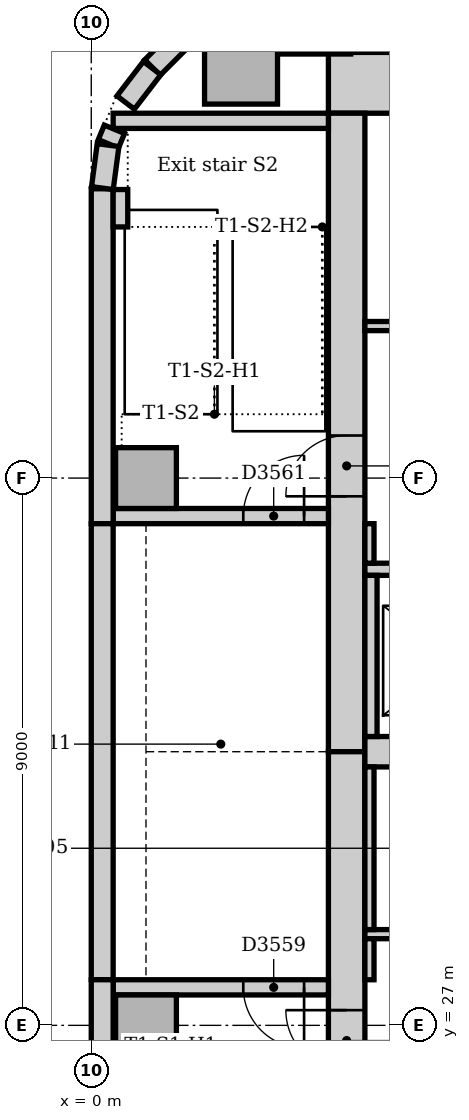
"""IFC4 building model, lengths in metres.
Left out: names, types, materials, properties, quantities, classifications, styles, units other than length and angle.
Written with IfcOpenShell. Run it as: python <this file> out.ifc"""

import sys

from ifc_helpers import new_model, si_unit, direction, frame, frame_2d, origin, origin_2d, place, context, subcontext, project, spatial, rectangle, extrude, element, fill, save


model = new_model("IFC4")
c1 = context("Model", 3, precision=1e-05, world=origin(), true_north=direction((0.0, 1.0)))
c2 = subcontext(c1, "Body", "Model", "MODEL_VIEW")
j1 = project(units=[si_unit("LENGTHUNIT", "METRE"), si_unit("PLANEANGLEUNIT", "RADIAN")], contexts=[c1])
p1 = place(None, origin())
s1 = spatial("IfcSite", under=j1, at=p1, CompositionType="ELEMENT")
p2 = place(p1, origin())
s2 = spatial("IfcBuilding", under=s1, at=p2, CompositionType="ELEMENT")
p3 = place(p2, frame((0.0, 0.0, 63.0)))
s3 = spatial("IfcBuildingStorey", under=s2, at=p3, CompositionType="ELEMENT", Elevation=63.0)
p4 = place(p3, frame((23.5, 42.5, 0.0), z_axis=(0.0, 0.0, 1.0), x_axis=(-1.0, 0.0, 0.0)))
e1 = element("IfcWall", 1, at=p4, inside=s3, PredefinedType="SOLIDWALL", context=c2, shape_type="SweptSolid", body=[
    extrude(rectangle(XDim=19.6, YDim=1.0, at=frame_2d((9.8, 0.0))), origin(), (0.0, 0.0, 1.0), 4.0),
])
p5 = place(p3, frame((4.2, 42.0, 0.0), z_axis=(0.0, 0.0, 1.0), x_axis=(0.0, -1.0, 0.0)))
e2 = element("IfcWall", 2, at=p5, inside=s3, PredefinedType="SOLIDWALL", context=c2, shape_type="SweptSolid", body=[
    extrude(rectangle(XDim=10.5, YDim=0.6, at=frame_2d((5.25, 0.0))), origin(), (0.0, 0.0, 1.0), 4.0),
])
p6 = place(p5, frame((5.3, 0.0, 0.0)))
e3 = element("IfcOpeningElement", 3, at=p6, cuts=e2, PredefinedType="OPENING", context=c2, shape_type="SweptSolid", body=[
    extrude(rectangle(XDim=1.0, YDim=2.1, at=frame_2d((0.5, 1.05))), frame((0.0, 0.31, 0.0), z_axis=(0.0, -1.0, 0.0), x_axis=(1.0, 0.0, 0.0)), (0.0, 0.0, 1.0), 0.62),
])
p7 = place(p3, frame((4.2, 31.5, 0.0), z_axis=(0.0, 0.0, 1.0), x_axis=(0.0, -1.0, 0.0)))
e4 = element("IfcWall", 4, at=p7, inside=s3, PredefinedType="SOLIDWALL", context=c2, shape_type="SweptSolid", body=[
    extrude(rectangle(XDim=10.5, YDim=0.6, at=frame_2d((5.25, 0.0))), origin(), (0.0, 0.0, 1.0), 4.0),
])
p8 = place(p7, frame((4.25, 0.0, 0.0)))
e5 = element("IfcOpeningElement", 5, at=p8, cuts=e4, PredefinedType="OPENING", context=c2, shape_type="SweptSolid", body=[
    extrude(rectangle(XDim=1.0, YDim=2.1, at=frame_2d((0.5, 1.05))), frame((0.0, 0.31, 0.0), z_axis=(0.0, -1.0, 0.0), x_axis=(1.0, 0.0, 0.0)), (0.0, 0.0, 1.0), 0.62),
])
p9 = place(p3, frame((4.5, 31.5, 0.0), z_axis=(0.0, 0.0, 1.0), x_axis=(1.0, 0.0, 0.0)))
e6 = element("IfcWall", 6, at=p9, inside=s3, PredefinedType="SOLIDWALL", context=c2, shape_type="SweptSolid", body=[
    extrude(rectangle(XDim=18.0, YDim=0.5, at=frame_2d((9.0, 0.0))), origin(), (0.0, 0.0, 1.0), 4.0),
])
p10 = place(p3, frame((3.9, 27.625, 0.0), z_axis=(0.0, 0.0, 1.0), x_axis=(-1.0, 0.0, 0.0)))
e7 = element("IfcWall", 7, at=p10, inside=s3, PredefinedType="SOLIDWALL", context=c2, shape_type="SweptSolid", body=[
    extrude(rectangle(XDim=3.54, YDim=0.25, at=frame_2d((1.77, 0.0))), origin(), (0.0, 0.0, 1.0), 4.0),
])
p11 = place(p10, frame((0.4, 0.0, 0.0)))
e8 = element("IfcOpeningElement", 8, at=p11, cuts=e7, PredefinedType="OPENING", context=c2, shape_type="SweptSolid", body=[
    extrude(rectangle(XDim=1.0, YDim=2.1, at=frame_2d((0.5, 1.05))), frame((0.0, 0.135, 0.0), z_axis=(0.0, -1.0, 0.0), x_axis=(1.0, 0.0, 0.0)), (0.0, 0.0, 1.0), 0.27),
])
p12 = place(p3, frame((0.36, 35.375, 0.0), z_axis=(0.0, 0.0, 1.0), x_axis=(1.0, 0.0, 0.0)))
e9 = element("IfcWall", 9, at=p12, inside=s3, PredefinedType="SOLIDWALL", context=c2, shape_type="SweptSolid", body=[
    extrude(rectangle(XDim=3.54, YDim=0.25, at=frame_2d((1.77, 0.0))), origin(), (0.0, 0.0, 1.0), 4.0),
])
p13 = place(p12, frame((2.14, 0.0, 0.0)))
e10 = element("IfcOpeningElement", 10, at=p13, cuts=e9, PredefinedType="OPENING", context=c2, shape_type="SweptSolid", body=[
    extrude(rectangle(XDim=1.0, YDim=2.1, at=frame_2d((0.5, 1.05))), frame((0.0, 0.135, 0.0), z_axis=(0.0, -1.0, 0.0), x_axis=(1.0, 0.0, 0.0)), (0.0, 0.0, 1.0), 0.27),
])
p14 = place(p3, frame((3.9, 41.875, 0.0), z_axis=(0.0, 0.0, 1.0), x_axis=(-1.0, 0.0, 0.0)))
e11 = element("IfcWall", 11, at=p14, inside=s3, PredefinedType="SOLIDWALL", context=c2, shape_type="SweptSolid", body=[
    extrude(rectangle(XDim=3.54, YDim=0.25, at=frame_2d((1.77, 0.0))), origin(), (0.0, 0.0, 1.0), 4.0),
])
for number, where, z_axis, x_axis in (
    (12, (3.667, 43.574, 0.0), (0.0, 0.0, 1.0), (1.0, 0.0, 0.0)),
    (13, (2.463, 42.75, 0.0), (0.0, 0.0, 1.0), (1.0, 0.0, 0.0)),
):
    element("IfcColumn", number, at=place(p3, frame(where, z_axis=z_axis, x_axis=x_axis)), inside=s3, PredefinedType="COLUMN", context=c2, shape_type="SweptSolid", body=[
        extrude(rectangle(XDim=1.2, YDim=1.2, at=origin_2d()), origin(), (0.0, 0.0, 1.0), 3.85),
    ])
for number, where, z_axis, x_axis in (
    (14, (0.9, 27.0, 0.0), (0.0, 0.0, 1.0), (1.0, 0.0, 0.0)),
    (15, (0.9, 36.0, 0.0), (0.0, 0.0, 1.0), (1.0, 0.0, 0.0)),
):
    element("IfcColumn", number, at=place(p3, frame(where, z_axis=z_axis, x_axis=x_axis)), inside=s3, PredefinedType="COLUMN", context=c2, shape_type="SweptSolid", body=[
        extrude(rectangle(XDim=1.0, YDim=1.0, at=origin_2d()), origin(), (0.0, 0.0, 1.0), 4.0),
    ])
p15 = place(p3, frame((2.249, 43.994, 0.0), z_axis=(0.0, 0.0, 1.0), x_axis=(-0.707106781187, -0.707106781187, 0.0)))
e16 = element("IfcWall", 16, at=p15, inside=s3, PredefinedType="STANDARD", context=c2, shape_type="SweptSolid", body=[
    extrude(rectangle(XDim=1.757, YDim=0.36, at=frame_2d((0.879, 0.0))), origin(), (0.0, 0.0, 1.0), 3.85),
])
p16 = place(p3, frame((0.18, 40.757, 0.0), z_axis=(0.0, 0.0, 1.0), x_axis=(0.0, -1.0, 0.0)))
e17 = element("IfcWall", 17, at=p16, inside=s3, PredefinedType="STANDARD", context=c2, shape_type="SweptSolid", body=[
    extrude(rectangle(XDim=5.507, YDim=0.36, at=frame_2d((2.754, 0.0))), origin(), (0.0, 0.0, 1.0), 3.85),
])
p17 = place(p3, frame((0.18, 35.25, 0.0), z_axis=(0.0, 0.0, 1.0), x_axis=(0.0, -1.0, 0.0)))
e18 = element("IfcWall", 18, at=p17, inside=s3, PredefinedType="STANDARD", context=c2, shape_type="SweptSolid", body=[
    extrude(rectangle(XDim=7.5, YDim=0.36, at=frame_2d((3.75, 0.0))), origin(), (0.0, 0.0, 1.0), 3.85),
])
p18 = place(p3, frame((0.18, 27.75, 0.0), z_axis=(0.0, 0.0, 1.0), x_axis=(0.0, -1.0, 0.0)))
e19 = element("IfcWall", 19, at=p18, inside=s3, PredefinedType="STANDARD", context=c2, shape_type="SweptSolid", body=[
    extrude(rectangle(XDim=6.75, YDim=0.36, at=frame_2d((3.375, 0.0))), origin(), (0.0, 0.0, 1.0), 3.85),
])
p19 = place(p3, frame((1.0, 42.741, 0.0), z_axis=(0.0, 0.0, 1.0), x_axis=(-0.608802368033, -0.793321924995, 0.0)))
e20 = element("IfcWall", 20, at=p19, inside=s3, PredefinedType="STANDARD", context=c2, shape_type="SweptSolid", body=[
    extrude(rectangle(XDim=0.713, YDim=0.36, at=frame_2d((0.357, 0.0))), origin(), (0.0, 0.0, 1.0), 3.85),
])
p20 = place(p3, frame((0.381, 41.736, 0.0), z_axis=(0.0, 0.0, 1.0), x_axis=(-0.382773360986, -0.923842277729, 0.0)))
e21 = element("IfcWall", 21, at=p20, inside=s3, PredefinedType="STANDARD", context=c2, shape_type="SweptSolid", body=[
    extrude(rectangle(XDim=0.258, YDim=0.36, at=frame_2d((0.129, 0.0))), origin(), (0.0, 0.0, 1.0), 3.85),
])
p21 = place(p3, frame((0.276, 41.476, 0.0), z_axis=(0.0, 0.0, 1.0), x_axis=(-0.13055608231, -0.99144092581, 0.0)))
e22 = element("IfcWall", 22, at=p21, inside=s3, PredefinedType="STANDARD", context=c2, shape_type="SweptSolid", body=[
    extrude(rectangle(XDim=0.713, YDim=0.36, at=frame_2d((0.356, 0.0))), origin(), (0.0, 0.0, 1.0), 3.85),
])
p22 = place(p3, frame((0.48, 40.13, 0.0), z_axis=(0.0, 0.0, 1.0), x_axis=(0.0, 1.0, 0.0)))
e23 = element("IfcWall", 23, at=p22, inside=s3, PredefinedType="STANDARD", context=c2, shape_type="SweptSolid", body=[
    extrude(rectangle(XDim=0.615, YDim=0.24, at=frame_2d((0.307, 0.0))), origin(), (0.0, 0.0, 1.0), 4.0),
])
p23 = place(p3, frame((4.5, 34.5, 0.0), z_axis=(0.0, 0.0, 1.0), x_axis=(1.0, 0.0, 0.0)))
e24 = element("IfcWall", 24, at=p23, inside=s3, PredefinedType="PARTITIONING", context=c2, shape_type="SweptSolid", body=[
    extrude(rectangle(XDim=18.0, YDim=0.2, at=frame_2d((9.0, 0.0))), origin(), (0.0, 0.0, 1.0), 3.85),
])
p24 = place(p23, frame((0.95, 0.0, 0.0)))
e25 = element("IfcOpeningElement", 25, at=p24, cuts=e24, PredefinedType="OPENING", context=c2, shape_type="SweptSolid", body=[
    extrude(rectangle(XDim=1.1, YDim=2.1, at=frame_2d((0.55, 1.05))), frame((0.0, 0.11, 0.0), z_axis=(0.0, -1.0, 0.0), x_axis=(1.0, 0.0, 0.0)), (0.0, 0.0, 1.0), 0.22),
])
p25 = place(p23, frame((3.95, 0.0, 0.0)))
e26 = element("IfcOpeningElement", 26, at=p25, cuts=e24, PredefinedType="OPENING", context=c2, shape_type="SweptSolid", body=[
    extrude(rectangle(XDim=1.1, YDim=2.1, at=frame_2d((0.55, 1.05))), frame((0.0, 0.11, 0.0), z_axis=(0.0, -1.0, 0.0), x_axis=(1.0, 0.0, 0.0)), (0.0, 0.0, 1.0), 0.22),
])
p26 = place(p23, frame((12.95, 0.0, 0.0)))
e27 = element("IfcOpeningElement", 27, at=p26, cuts=e24, PredefinedType="OPENING", context=c2, shape_type="SweptSolid", body=[
    extrude(rectangle(XDim=1.1, YDim=2.1, at=frame_2d((0.55, 1.05))), frame((0.0, 0.11, 0.0), z_axis=(0.0, -1.0, 0.0), x_axis=(1.0, 0.0, 0.0)), (0.0, 0.0, 1.0), 0.22),
])
p27 = place(p23, frame((15.95, 0.0, 0.0)))
e28 = element("IfcOpeningElement", 28, at=p27, cuts=e24, PredefinedType="OPENING", context=c2, shape_type="SweptSolid", body=[
    extrude(rectangle(XDim=1.1, YDim=2.1, at=frame_2d((0.55, 1.05))), frame((0.0, 0.11, 0.0), z_axis=(0.0, -1.0, 0.0), x_axis=(1.0, 0.0, 0.0)), (0.0, 0.0, 1.0), 0.22),
])
p28 = place(p3, frame((4.6, 31.75, 0.0), z_axis=(0.0, 0.0, 1.0), x_axis=(0.0, 1.0, 0.0)))
e29 = element("IfcWall", 29, at=p28, inside=s3, PredefinedType="PARTITIONING", context=c2, shape_type="SweptSolid", body=[
    extrude(rectangle(XDim=2.65, YDim=0.2, at=frame_2d((1.325, 0.0))), origin(), (0.0, 0.0, 1.0), 3.85),
])
p29 = place(p3, frame((4.5, 28.5, 0.0), z_axis=(0.0, 0.0, 1.0), x_axis=(1.0, 0.0, 0.0)))
e30 = element("IfcWall", 30, at=p29, inside=s3, PredefinedType="PARTITIONING", context=c2, shape_type="SweptSolid", body=[
    extrude(rectangle(XDim=18.0, YDim=0.15, at=frame_2d((9.0, 0.0))), origin(), (0.0, 0.0, 1.0), 3.85),
])
p30 = place(p29, frame((1.1, 0.0, 0.0)))
e31 = element("IfcOpeningElement", 31, at=p30, cuts=e30, PredefinedType="OPENING", context=c2, shape_type="SweptSolid", body=[
    extrude(rectangle(XDim=0.9, YDim=2.1, at=frame_2d((0.45, 1.05))), frame((0.0, 0.085, 0.0), z_axis=(0.0, -1.0, 0.0), x_axis=(1.0, 0.0, 0.0)), (0.0, 0.0, 1.0), 0.17),
])
p31 = place(p29, frame((5.55, 0.0, 0.0)))
e32 = element("IfcOpeningElement", 32, at=p31, cuts=e30, PredefinedType="OPENING", context=c2, shape_type="SweptSolid", body=[
    extrude(rectangle(XDim=0.9, YDim=2.1, at=frame_2d((0.45, 1.05))), frame((0.0, 0.085, 0.0), z_axis=(0.0, -1.0, 0.0), x_axis=(1.0, 0.0, 0.0)), (0.0, 0.0, 1.0), 0.17),
])
p32 = place(p29, frame((12.95, 0.0, 0.0)))
e33 = element("IfcOpeningElement", 33, at=p32, cuts=e30, PredefinedType="OPENING", context=c2, shape_type="SweptSolid", body=[
    extrude(rectangle(XDim=0.9, YDim=2.1, at=frame_2d((0.45, 1.05))), frame((0.0, 0.085, 0.0), z_axis=(0.0, -1.0, 0.0), x_axis=(1.0, 0.0, 0.0)), (0.0, 0.0, 1.0), 0.17),
])
p33 = place(p3, frame((4.5, 38.5, 0.0), z_axis=(0.0, 0.0, 1.0), x_axis=(1.0, 0.0, 0.0)))
e34 = element("IfcWall", 34, at=p33, inside=s3, PredefinedType="PARTITIONING", context=c2, shape_type="SweptSolid", body=[
    extrude(rectangle(XDim=11.9, YDim=0.15, at=frame_2d((5.95, 0.0))), origin(), (0.0, 0.0, 1.0), 3.85),
])
p34 = place(p33, frame((1.85, 0.0, 0.0)))
e35 = element("IfcOpeningElement", 35, at=p34, cuts=e34, PredefinedType="OPENING", context=c2, shape_type="SweptSolid", body=[
    extrude(rectangle(XDim=0.9, YDim=2.1, at=frame_2d((0.45, 1.05))), frame((0.0, 0.085, 0.0), z_axis=(0.0, -1.0, 0.0), x_axis=(1.0, 0.0, 0.0)), (0.0, 0.0, 1.0), 0.17),
])
p35 = place(p33, frame((5.55, 0.0, 0.0)))
e36 = element("IfcOpeningElement", 36, at=p35, cuts=e34, PredefinedType="OPENING", context=c2, shape_type="SweptSolid", body=[
    extrude(rectangle(XDim=0.9, YDim=2.1, at=frame_2d((0.45, 1.05))), frame((0.0, 0.085, 0.0), z_axis=(0.0, -1.0, 0.0), x_axis=(1.0, 0.0, 0.0)), (0.0, 0.0, 1.0), 0.17),
])
p36 = place(p33, frame((7.8, 0.0, 0.0)))
e37 = element("IfcOpeningElement", 37, at=p36, cuts=e34, PredefinedType="OPENING", context=c2, shape_type="SweptSolid", body=[
    extrude(rectangle(XDim=0.9, YDim=2.1, at=frame_2d((0.45, 1.05))), frame((0.0, 0.085, 0.0), z_axis=(0.0, -1.0, 0.0), x_axis=(1.0, 0.0, 0.0)), (0.0, 0.0, 1.0), 0.17),
])
p37 = place(p33, frame((9.95, 0.0, 0.0)))
e38 = element("IfcOpeningElement", 38, at=p37, cuts=e34, PredefinedType="OPENING", context=c2, shape_type="SweptSolid", body=[
    extrude(rectangle(XDim=0.8, YDim=2.1, at=frame_2d((0.4, 1.05))), frame((0.0, 0.085, 0.0), z_axis=(0.0, -1.0, 0.0), x_axis=(1.0, 0.0, 0.0)), (0.0, 0.0, 1.0), 0.17),
])
p38 = place(p3, frame((4.575, 27.75, 0.0), z_axis=(0.0, 0.0, 1.0), x_axis=(0.0, 1.0, 0.0)))
e39 = element("IfcWall", 39, at=p38, inside=s3, PredefinedType="PARTITIONING", context=c2, shape_type="SweptSolid", body=[
    extrude(rectangle(XDim=0.675, YDim=0.15, at=frame_2d((0.338, 0.0))), origin(), (0.0, 0.0, 1.0), 3.85),
])
p39 = place(p3, frame((4.575, 28.575, 0.0), z_axis=(0.0, 0.0, 1.0), x_axis=(0.0, 1.0, 0.0)))
e40 = element("IfcWall", 40, at=p39, inside=s3, PredefinedType="PARTITIONING", context=c2, shape_type="SweptSolid", body=[
    extrude(rectangle(XDim=2.675, YDim=0.15, at=frame_2d((1.337, 0.0))), origin(), (0.0, 0.0, 1.0), 3.85),
])
p40 = place(p3, frame((4.575, 34.6, 0.0), z_axis=(0.0, 0.0, 1.0), x_axis=(0.0, 1.0, 0.0)))
e41 = element("IfcWall", 41, at=p40, inside=s3, PredefinedType="PARTITIONING", context=c2, shape_type="SweptSolid", body=[
    extrude(rectangle(XDim=0.65, YDim=0.15, at=frame_2d((0.325, 0.0))), origin(), (0.0, 0.0, 1.0), 3.85),
])
p41 = place(p8, frame((1.0, 0.0, 0.0), z_axis=(0.0, 0.0, 1.0), x_axis=(-1.0, 0.0, 0.0)))
e42 = element("IfcDoor", 42, at=p41, inside=s3, OperationType="SINGLE_SWING_RIGHT", PredefinedType="DOOR", context=c2, shape_type="SweptSolid", body=[
    extrude(rectangle(XDim=1.0, YDim=2.1, at=frame_2d((0.5, 1.05))), frame((0.0, 0.025, 0.0), z_axis=(0.0, -1.0, 0.0), x_axis=(1.0, 0.0, 0.0)), (0.0, 0.0, 1.0), 0.05),
])
fill(e5, e42)
p42 = place(p11, origin())
e43 = element("IfcDoor", 43, at=p42, inside=s3, OperationType="SINGLE_SWING_LEFT", PredefinedType="DOOR", context=c2, shape_type="SweptSolid", body=[
    extrude(rectangle(XDim=1.0, YDim=2.1, at=frame_2d((0.5, 1.05))), frame((0.0, 0.025, 0.0), z_axis=(0.0, -1.0, 0.0), x_axis=(1.0, 0.0, 0.0)), (0.0, 0.0, 1.0), 0.05),
])
fill(e8, e43)
p43 = place(p6, frame((1.0, 0.0, 0.0), z_axis=(0.0, 0.0, 1.0), x_axis=(-1.0, 0.0, 0.0)))
e44 = element("IfcDoor", 44, at=p43, inside=s3, OperationType="SINGLE_SWING_LEFT", PredefinedType="DOOR", context=c2, shape_type="SweptSolid", body=[
    extrude(rectangle(XDim=1.0, YDim=2.1, at=frame_2d((0.5, 1.05))), frame((0.0, 0.025, 0.0), z_axis=(0.0, -1.0, 0.0), x_axis=(1.0, 0.0, 0.0)), (0.0, 0.0, 1.0), 0.05),
])
fill(e3, e44)
p44 = place(p13, origin())
e45 = element("IfcDoor", 45, at=p44, inside=s3, OperationType="SINGLE_SWING_RIGHT", PredefinedType="DOOR", context=c2, shape_type="SweptSolid", body=[
    extrude(rectangle(XDim=1.0, YDim=2.1, at=frame_2d((0.5, 1.05))), frame((0.0, 0.025, 0.0), z_axis=(0.0, -1.0, 0.0), x_axis=(1.0, 0.0, 0.0)), (0.0, 0.0, 1.0), 0.05),
])
fill(e10, e45)
save(model, sys.argv[1])
